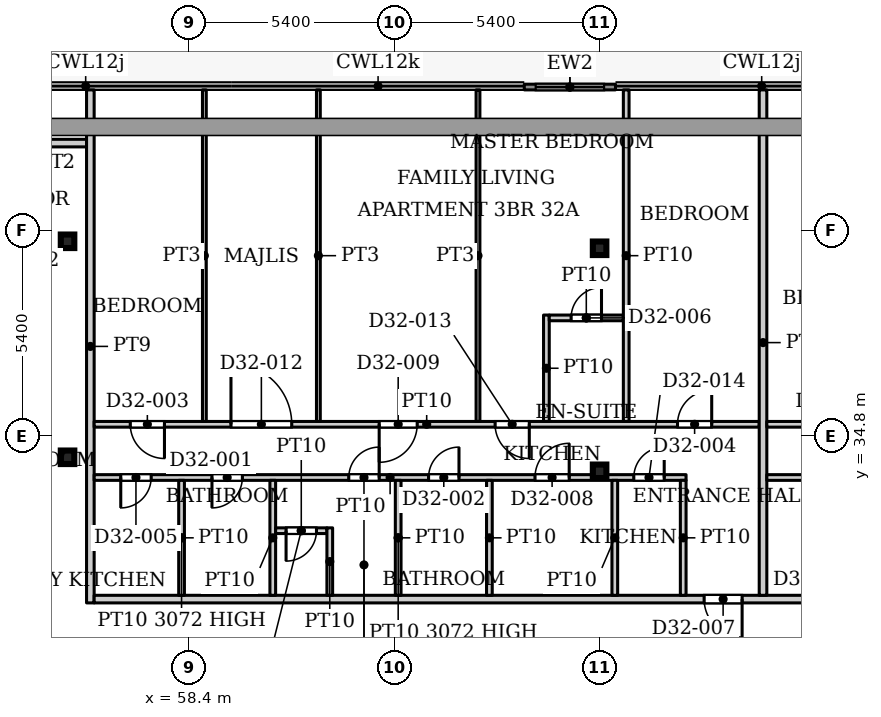
"""IFC4 building model, lengths in metres.
Left out: names, types, materials, properties, quantities, classifications, styles, units other than length and angle.
Written with IfcOpenShell. Run it as: python <this file> out.ifc"""

import sys

from ifc_helpers import new_model, si_unit, direction, frame, frame_2d, origin, origin_2d, place, context, subcontext, project, spatial, rectangle, hollow_rectangle, extrude, source, transform, mapped, element, fill, save


model = new_model("IFC4")
c1 = context("Model", 3, precision=1e-05, world=origin(), true_north=direction((0.0, 1.0)))
c2 = subcontext(c1, "Body", "Model", "MODEL_VIEW")
j1 = project(units=[si_unit("LENGTHUNIT", "METRE"), si_unit("PLANEANGLEUNIT", "RADIAN")], contexts=[c1])
p1 = place(None, origin())
s1 = spatial("IfcSite", under=j1, at=p1, CompositionType="ELEMENT")
p2 = place(p1, origin())
s2 = spatial("IfcBuilding", under=s1, at=p2, CompositionType="ELEMENT")
p3 = place(p2, frame((0.0, 0.0, 137.0)))
s3 = spatial("IfcBuildingStorey", under=s2, at=p3, CompositionType="ELEMENT", Elevation=137.0)
for number, where, z_axis, x_axis in (
    (1, (69.2, 33.863, 0.0), (0.0, 0.0, 1.0), (1.0, 0.0, 0.0)),
    (2, (55.2, 34.232, 0.0), (0.0, 0.0, 1.0), (1.0, 0.0, 0.0)),
    (3, (69.2, 39.732, 0.0), (0.0, 0.0, 1.0), (1.0, 0.0, 0.0)),
    (4, (55.2, 39.916, 0.0), (0.0, 0.0, 1.0), (1.0, 0.0, 0.0)),
):
    element("IfcColumn", number, at=place(p3, frame(where, z_axis=z_axis, x_axis=x_axis)), inside=s3, PredefinedType="COLUMN", context=c2, shape_type="SweptSolid", body=[
        extrude(hollow_rectangle(XDim=0.356, YDim=0.356, WallThickness=0.016, InnerFilletRadius=0.016, OuterFilletRadius=0.032, at=origin_2d()), origin(), (0.0, 0.0, 1.0), 3.9),
    ])
p4 = place(p3, frame((67.218, 43.975, 0.0), z_axis=(0.0, 0.0, 1.0), x_axis=(1.0, 0.0, 0.0)))
e5 = element("IfcWall", 5, at=p4, inside=s3, PredefinedType="SOLIDWALL", context=c2, shape_type="SweptSolid", body=[
    extrude(rectangle(XDim=2.4, YDim=0.15, at=frame_2d((1.2, 0.0))), origin(), (0.0, 0.0, 1.0), 3.75),
])
p5 = place(p4, frame((0.3, 0.0, 0.0)))
e6 = element("IfcOpeningElement", 6, at=p5, cuts=e5, PredefinedType="OPENING", context=c2, shape_type="SweptSolid", body=[
    extrude(rectangle(XDim=1.8, YDim=2.4, at=frame_2d((0.9, 1.2))), frame((0.0, 0.085, 0.0), z_axis=(0.0, -1.0, 0.0), x_axis=(1.0, 0.0, 0.0)), (0.0, 0.0, 1.0), 0.17),
])
p6 = place(p3, frame((53.5, 42.5, 0.0), z_axis=(0.0, 0.0, 1.0), x_axis=(1.0, 0.0, 0.0)))
e7 = element("IfcWall", 7, at=p6, inside=s3, PredefinedType="PARTITIONING", context=c2, shape_type="SweptSolid", body=[
    extrude(rectangle(XDim=2.2, YDim=0.2, at=frame_2d((1.1, 0.0))), origin(), (0.0, 0.0, 1.0), 3.6),
])
p7 = place(p3, frame((55.8, 30.4, 0.0), z_axis=(0.0, 0.0, 1.0), x_axis=(0.0, 1.0, 0.0)))
e8 = element("IfcWall", 8, at=p7, inside=s3, PredefinedType="PARTITIONING", context=c2, shape_type="SweptSolid", body=[
    extrude(rectangle(XDim=13.5, YDim=0.2, at=frame_2d((6.75, 0.0))), origin(), (0.0, 0.0, 1.0), 3.6),
])
p8 = place(p3, frame((55.9, 30.5, 0.0), z_axis=(0.0, 0.0, 1.0), x_axis=(1.0, 0.0, 0.0)))
e9 = element("IfcWall", 9, at=p8, inside=s3, PredefinedType="PARTITIONING", context=c2, shape_type="SweptSolid", body=[
    extrude(rectangle(XDim=42.2, YDim=0.2, at=frame_2d((21.1, 0.0))), origin(), (0.0, 0.0, 1.0), 3.6),
])
p9 = place(p8, frame((16.05, 0.0, 0.0)))
e10 = element("IfcOpeningElement", 10, at=p9, cuts=e9, PredefinedType="OPENING", context=c2, shape_type="SweptSolid", body=[
    extrude(rectangle(XDim=1.0, YDim=2.1, at=frame_2d((0.5, 1.05))), frame((0.0, 0.11, 0.0), z_axis=(0.0, -1.0, 0.0), x_axis=(1.0, 0.0, 0.0)), (0.0, 0.0, 1.0), 0.22),
])
p10 = place(p8, frame((22.8, 0.0, 0.0)))
e11 = element("IfcOpeningElement", 11, at=p10, cuts=e9, PredefinedType="OPENING", context=c2, shape_type="SweptSolid", body=[
    extrude(rectangle(XDim=1.0, YDim=2.1, at=frame_2d((0.5, 1.05))), frame((0.0, 0.11, 0.0), z_axis=(0.0, -1.0, 0.0), x_axis=(1.0, 0.0, 0.0)), (0.0, 0.0, 1.0), 0.22),
])
p11 = place(p8, frame((29.55, 0.0, 0.0)))
e12 = element("IfcOpeningElement", 12, at=p11, cuts=e9, PredefinedType="OPENING", context=c2, shape_type="SweptSolid", body=[
    extrude(rectangle(XDim=1.0, YDim=2.1, at=frame_2d((0.5, 1.05))), frame((0.0, 0.11, 0.0), z_axis=(0.0, -1.0, 0.0), x_axis=(1.0, 0.0, 0.0)), (0.0, 0.0, 1.0), 0.22),
])
p12 = place(p3, frame((55.9, 33.7, 0.0), z_axis=(0.0, 0.0, 1.0), x_axis=(1.0, 0.0, 0.0)))
e13 = element("IfcWall", 13, at=p12, inside=s3, PredefinedType="PARTITIONING", context=c2, shape_type="SweptSolid", body=[
    extrude(rectangle(XDim=15.575, YDim=0.15, at=frame_2d((7.788, 0.0))), origin(), (0.0, 0.0, 1.0), 3.6),
])
p13 = place(p12, frame((3.1, 0.0, 0.0)))
e14 = element("IfcOpeningElement", 14, at=p13, cuts=e13, PredefinedType="OPENING", context=c2, shape_type="SweptSolid", body=[
    extrude(rectangle(XDim=0.8, YDim=2.1, at=frame_2d((0.4, 1.05))), frame((0.0, 0.085, 0.0), z_axis=(0.0, -1.0, 0.0), x_axis=(1.0, 0.0, 0.0)), (0.0, 0.0, 1.0), 0.17),
])
p14 = place(p12, frame((8.8, 0.0, 0.0)))
e15 = element("IfcOpeningElement", 15, at=p14, cuts=e13, PredefinedType="OPENING", context=c2, shape_type="SweptSolid", body=[
    extrude(rectangle(XDim=0.8, YDim=2.1, at=frame_2d((0.4, 1.05))), frame((0.0, 0.085, 0.0), z_axis=(0.0, -1.0, 0.0), x_axis=(1.0, 0.0, 0.0)), (0.0, 0.0, 1.0), 0.17),
])
p15 = place(p12, frame((0.7, 0.0, 0.0)))
e16 = element("IfcOpeningElement", 16, at=p15, cuts=e13, PredefinedType="OPENING", context=c2, shape_type="SweptSolid", body=[
    extrude(rectangle(XDim=0.8, YDim=2.1, at=frame_2d((0.4, 1.05))), frame((0.0, 0.085, 0.0), z_axis=(0.0, -1.0, 0.0), x_axis=(1.0, 0.0, 0.0)), (0.0, 0.0, 1.0), 0.17),
])
p16 = place(p12, frame((11.6, 0.0, 0.0)))
e17 = element("IfcOpeningElement", 17, at=p16, cuts=e13, PredefinedType="OPENING", context=c2, shape_type="SweptSolid", body=[
    extrude(rectangle(XDim=0.9, YDim=2.1, at=frame_2d((0.45, 1.05))), frame((0.0, 0.085, 0.0), z_axis=(0.0, -1.0, 0.0), x_axis=(1.0, 0.0, 0.0)), (0.0, 0.0, 1.0), 0.17),
])
p17 = place(p12, frame((6.7, 0.0, 0.0)))
e18 = element("IfcOpeningElement", 18, at=p17, cuts=e13, PredefinedType="OPENING", context=c2, shape_type="SweptSolid", body=[
    extrude(rectangle(XDim=0.8, YDim=2.1, at=frame_2d((0.4, 1.05))), frame((0.0, 0.085, 0.0), z_axis=(0.0, -1.0, 0.0), x_axis=(1.0, 0.0, 0.0)), (0.0, 0.0, 1.0), 0.17),
])
p18 = place(p12, frame((14.2, 0.0, 0.0)))
e19 = element("IfcOpeningElement", 19, at=p18, cuts=e13, PredefinedType="OPENING", context=c2, shape_type="SweptSolid", body=[
    extrude(rectangle(XDim=0.8, YDim=2.1, at=frame_2d((0.4, 1.05))), frame((0.0, 0.085, 0.0), z_axis=(0.0, -1.0, 0.0), x_axis=(1.0, 0.0, 0.0)), (0.0, 0.0, 1.0), 0.17),
])
p19 = place(p3, frame((55.9, 35.1, 0.0), z_axis=(0.0, 0.0, 1.0), x_axis=(1.0, 0.0, 0.0)))
e20 = element("IfcWall", 20, at=p19, inside=s3, PredefinedType="PARTITIONING", context=c2, shape_type="SweptSolid", body=[
    extrude(rectangle(XDim=17.5, YDim=0.15, at=frame_2d((8.75, 0.0))), origin(), (0.0, 0.0, 1.0), 3.6),
])
p20 = place(p19, frame((0.95, 0.0, 0.0)))
e21 = element("IfcOpeningElement", 21, at=p20, cuts=e20, PredefinedType="OPENING", context=c2, shape_type="SweptSolid", body=[
    extrude(rectangle(XDim=0.9, YDim=2.1, at=frame_2d((0.45, 1.05))), frame((0.0, 0.085, 0.0), z_axis=(0.0, -1.0, 0.0), x_axis=(1.0, 0.0, 0.0)), (0.0, 0.0, 1.0), 0.17),
])
p21 = place(p19, frame((15.35, 0.0, 0.0)))
e22 = element("IfcOpeningElement", 22, at=p21, cuts=e20, PredefinedType="OPENING", context=c2, shape_type="SweptSolid", body=[
    extrude(rectangle(XDim=0.9, YDim=2.1, at=frame_2d((0.45, 1.05))), frame((0.0, 0.085, 0.0), z_axis=(0.0, -1.0, 0.0), x_axis=(1.0, 0.0, 0.0)), (0.0, 0.0, 1.0), 0.17),
])
p22 = place(p19, frame((7.5, 0.0, 0.0)))
e23 = element("IfcOpeningElement", 23, at=p22, cuts=e20, PredefinedType="OPENING", context=c2, shape_type="SweptSolid", body=[
    extrude(rectangle(XDim=1.0, YDim=2.1, at=frame_2d((0.5, 1.05))), frame((0.0, 0.085, 0.0), z_axis=(0.0, -1.0, 0.0), x_axis=(1.0, 0.0, 0.0)), (0.0, 0.0, 1.0), 0.17),
])
p23 = place(p19, frame((3.6, 0.0, 0.0)))
e24 = element("IfcOpeningElement", 24, at=p23, cuts=e20, PredefinedType="OPENING", context=c2, shape_type="SweptSolid", body=[
    extrude(rectangle(XDim=1.6, YDim=2.1, at=frame_2d((0.8, 1.05))), frame((0.0, 0.085, 0.0), z_axis=(0.0, -1.0, 0.0), x_axis=(1.0, 0.0, 0.0)), (0.0, 0.0, 1.0), 0.17),
])
p24 = place(p19, frame((10.55, 0.0, 0.0)))
e25 = element("IfcOpeningElement", 25, at=p24, cuts=e20, PredefinedType="OPENING", context=c2, shape_type="SweptSolid", body=[
    extrude(rectangle(XDim=0.9, YDim=2.1, at=frame_2d((0.45, 1.05))), frame((0.0, 0.085, 0.0), z_axis=(0.0, -1.0, 0.0), x_axis=(1.0, 0.0, 0.0)), (0.0, 0.0, 1.0), 0.17),
])
p25 = place(p3, frame((58.2, 30.6, 0.0), z_axis=(0.0, 0.0, 1.0), x_axis=(0.0, 1.0, 0.0)))
e26 = element("IfcWall", 26, at=p25, inside=s3, PredefinedType="PARTITIONING", context=c2, shape_type="SweptSolid", body=[
    extrude(rectangle(XDim=3.025, YDim=0.15, at=frame_2d((1.512, 0.0))), origin(), (0.0, 0.0, 1.0), 3.072),
])
p26 = place(p3, frame((58.8, 35.175, 0.0), z_axis=(0.0, 0.0, 1.0), x_axis=(0.0, 1.0, 0.0)))
e27 = element("IfcWall", 27, at=p26, inside=s3, PredefinedType="PARTITIONING", context=c2, shape_type="SweptSolid", body=[
    extrude(rectangle(XDim=8.725, YDim=0.1, at=frame_2d((4.362, 0.0))), origin(), (0.0, 0.0, 1.0), 3.6),
])
p27 = place(p3, frame((60.6, 30.6, 0.0), z_axis=(0.0, 0.0, 1.0), x_axis=(0.0, 1.0, 0.0)))
e28 = element("IfcWall", 28, at=p27, inside=s3, PredefinedType="PARTITIONING", context=c2, shape_type="SweptSolid", body=[
    extrude(rectangle(XDim=3.025, YDim=0.15, at=frame_2d((1.512, 0.0))), origin(), (0.0, 0.0, 1.0), 3.6),
])
p28 = place(p3, frame((60.675, 32.3, 0.0), z_axis=(0.0, 0.0, 1.0), x_axis=(1.0, 0.0, 0.0)))
e29 = element("IfcWall", 29, at=p28, inside=s3, PredefinedType="PARTITIONING", context=c2, shape_type="SweptSolid", body=[
    extrude(rectangle(XDim=1.35, YDim=0.15, at=frame_2d((0.675, 0.0))), origin(), (0.0, 0.0, 1.0), 3.6),
])
p29 = place(p28, frame((0.275, 0.0, 0.0)))
e30 = element("IfcOpeningElement", 30, at=p29, cuts=e29, PredefinedType="OPENING", context=c2, shape_type="SweptSolid", body=[
    extrude(rectangle(XDim=0.8, YDim=2.1, at=frame_2d((0.4, 1.05))), frame((0.0, 0.085, 0.0), z_axis=(0.0, -1.0, 0.0), x_axis=(1.0, 0.0, 0.0)), (0.0, 0.0, 1.0), 0.17),
])
p30 = place(p3, frame((61.8, 35.175, 0.0), z_axis=(0.0, 0.0, 1.0), x_axis=(0.0, 1.0, 0.0)))
e31 = element("IfcWall", 31, at=p30, inside=s3, PredefinedType="PARTITIONING", context=c2, shape_type="SweptSolid", body=[
    extrude(rectangle(XDim=8.725, YDim=0.1, at=frame_2d((4.362, 0.0))), origin(), (0.0, 0.0, 1.0), 3.6),
])
p31 = place(p3, frame((62.1, 30.6, 0.0), z_axis=(0.0, 0.0, 1.0), x_axis=(0.0, 1.0, 0.0)))
e32 = element("IfcWall", 32, at=p31, inside=s3, PredefinedType="PARTITIONING", context=c2, shape_type="SweptSolid", body=[
    extrude(rectangle(XDim=1.775, YDim=0.15, at=frame_2d((0.887, 0.0))), origin(), (0.0, 0.0, 1.0), 3.6),
])
p32 = place(p3, frame((63.9, 30.6, 0.0), z_axis=(0.0, 0.0, 1.0), x_axis=(0.0, 1.0, 0.0)))
e33 = element("IfcWall", 33, at=p32, inside=s3, PredefinedType="PARTITIONING", context=c2, shape_type="SweptSolid", body=[
    extrude(rectangle(XDim=3.025, YDim=0.15, at=frame_2d((1.512, 0.0))), origin(), (0.0, 0.0, 1.0), 3.072),
])
p33 = place(p3, frame((66.0, 35.175, 0.0), z_axis=(0.0, 0.0, 1.0), x_axis=(0.0, 1.0, 0.0)))
e34 = element("IfcWall", 34, at=p33, inside=s3, PredefinedType="PARTITIONING", context=c2, shape_type="SweptSolid", body=[
    extrude(rectangle(XDim=8.725, YDim=0.1, at=frame_2d((4.362, 0.0))), origin(), (0.0, 0.0, 1.0), 3.6),
])
p34 = place(p3, frame((66.3, 30.6, 0.0), z_axis=(0.0, 0.0, 1.0), x_axis=(0.0, 1.0, 0.0)))
e35 = element("IfcWall", 35, at=p34, inside=s3, PredefinedType="PARTITIONING", context=c2, shape_type="SweptSolid", body=[
    extrude(rectangle(XDim=3.025, YDim=0.15, at=frame_2d((1.512, 0.0))), origin(), (0.0, 0.0, 1.0), 3.6),
])
p35 = place(p3, frame((67.8, 35.175, 0.0), z_axis=(0.0, 0.0, 1.0), x_axis=(0.0, 1.0, 0.0)))
e36 = element("IfcWall", 36, at=p35, inside=s3, PredefinedType="PARTITIONING", context=c2, shape_type="SweptSolid", body=[
    extrude(rectangle(XDim=2.8, YDim=0.15, at=frame_2d((1.4, 0.0))), origin(), (0.0, 0.0, 1.0), 3.6),
])
p36 = place(p3, frame((67.875, 37.9, 0.0), z_axis=(0.0, 0.0, 1.0), x_axis=(1.0, 0.0, 0.0)))
e37 = element("IfcWall", 37, at=p36, inside=s3, PredefinedType="PARTITIONING", context=c2, shape_type="SweptSolid", body=[
    extrude(rectangle(XDim=1.95, YDim=0.15, at=frame_2d((0.975, 0.0))), origin(), (0.0, 0.0, 1.0), 3.6),
])
p37 = place(p36, frame((0.575, 0.0, 0.0)))
e38 = element("IfcOpeningElement", 38, at=p37, cuts=e37, PredefinedType="OPENING", context=c2, shape_type="SweptSolid", body=[
    extrude(rectangle(XDim=0.8, YDim=2.1, at=frame_2d((0.4, 1.05))), frame((0.0, 0.085, 0.0), z_axis=(0.0, -1.0, 0.0), x_axis=(1.0, 0.0, 0.0)), (0.0, 0.0, 1.0), 0.17),
])
p38 = place(p3, frame((69.6, 30.6, 0.0), z_axis=(0.0, 0.0, 1.0), x_axis=(0.0, 1.0, 0.0)))
e39 = element("IfcWall", 39, at=p38, inside=s3, PredefinedType="PARTITIONING", context=c2, shape_type="SweptSolid", body=[
    extrude(rectangle(XDim=3.025, YDim=0.15, at=frame_2d((1.512, 0.0))), origin(), (0.0, 0.0, 1.0), 3.6),
])
p39 = place(p3, frame((69.9, 35.175, 0.0), z_axis=(0.0, 0.0, 1.0), x_axis=(0.0, 1.0, 0.0)))
e40 = element("IfcWall", 40, at=p39, inside=s3, PredefinedType="PARTITIONING", context=c2, shape_type="SweptSolid", body=[
    extrude(rectangle(XDim=8.725, YDim=0.15, at=frame_2d((4.362, 0.0))), origin(), (0.0, 0.0, 1.0), 3.6),
])
p40 = place(p3, frame((71.4, 30.6, 0.0), z_axis=(0.0, 0.0, 1.0), x_axis=(0.0, 1.0, 0.0)))
e41 = element("IfcWall", 41, at=p40, inside=s3, PredefinedType="PARTITIONING", context=c2, shape_type="SweptSolid", body=[
    extrude(rectangle(XDim=3.025, YDim=0.15, at=frame_2d((1.512, 0.0))), origin(), (0.0, 0.0, 1.0), 3.6),
])
p41 = place(p3, frame((73.5, 30.6, 0.0), z_axis=(0.0, 0.0, 1.0), x_axis=(0.0, 1.0, 0.0)))
e42 = element("IfcWall", 42, at=p41, inside=s3, PredefinedType="PARTITIONING", context=c2, shape_type="SweptSolid", body=[
    extrude(rectangle(XDim=13.3, YDim=0.2, at=frame_2d((6.65, 0.0))), origin(), (0.0, 0.0, 1.0), 3.6),
])
p42 = place(p3, frame((73.6, 33.7, 0.0), z_axis=(0.0, 0.0, 1.0), x_axis=(1.0, 0.0, 0.0)))
e43 = element("IfcWall", 43, at=p42, inside=s3, PredefinedType="PARTITIONING", context=c2, shape_type="SweptSolid", body=[
    extrude(rectangle(XDim=4.775, YDim=0.15, at=frame_2d((2.387, 0.0))), origin(), (0.0, 0.0, 1.0), 3.6),
])
p43 = place(p42, frame((1.1, 0.0, 0.0)))
e44 = element("IfcOpeningElement", 44, at=p43, cuts=e43, PredefinedType="OPENING", context=c2, shape_type="SweptSolid", body=[
    extrude(rectangle(XDim=0.9, YDim=2.1, at=frame_2d((0.45, 1.05))), frame((0.0, 0.085, 0.0), z_axis=(0.0, -1.0, 0.0), x_axis=(1.0, 0.0, 0.0)), (0.0, 0.0, 1.0), 0.17),
])
p44 = place(p42, frame((3.55, 0.0, 0.0)))
e45 = element("IfcOpeningElement", 45, at=p44, cuts=e43, PredefinedType="OPENING", context=c2, shape_type="SweptSolid", body=[
    extrude(rectangle(XDim=0.8, YDim=2.1, at=frame_2d((0.4, 1.05))), frame((0.0, 0.085, 0.0), z_axis=(0.0, -1.0, 0.0), x_axis=(1.0, 0.0, 0.0)), (0.0, 0.0, 1.0), 0.17),
])
p45 = place(p3, frame((73.6, 35.1, 0.0), z_axis=(0.0, 0.0, 1.0), x_axis=(1.0, 0.0, 0.0)))
e46 = element("IfcWall", 46, at=p45, inside=s3, PredefinedType="PARTITIONING", context=c2, shape_type="SweptSolid", body=[
    extrude(rectangle(XDim=8.8, YDim=0.15, at=frame_2d((4.4, 0.0))), origin(), (0.0, 0.0, 1.0), 3.6),
])
p46 = place(p45, frame((1.4, 0.0, 0.0)))
e47 = element("IfcOpeningElement", 47, at=p46, cuts=e46, PredefinedType="OPENING", context=c2, shape_type="SweptSolid", body=[
    extrude(rectangle(XDim=0.9, YDim=2.1, at=frame_2d((0.45, 1.05))), frame((0.0, 0.085, 0.0), z_axis=(0.0, -1.0, 0.0), x_axis=(1.0, 0.0, 0.0)), (0.0, 0.0, 1.0), 0.17),
])
p47 = place(p45, frame((5.85, 0.0, 0.0)))
e48 = element("IfcOpeningElement", 48, at=p47, cuts=e46, PredefinedType="OPENING", context=c2, shape_type="SweptSolid", body=[
    extrude(rectangle(XDim=1.0, YDim=2.1, at=frame_2d((0.5, 1.05))), frame((0.0, 0.085, 0.0), z_axis=(0.0, -1.0, 0.0), x_axis=(1.0, 0.0, 0.0)), (0.0, 0.0, 1.0), 0.17),
])
m1 = source(origin(), c2, "Body", "SweptSolid", [
    extrude(rectangle(XDim=1.8, YDim=2.4, at=frame_2d((0.9, 1.2))), frame((0.0, 0.025, 0.0), z_axis=(0.0, -1.0, 0.0), x_axis=(1.0, 0.0, 0.0)), (0.0, 0.0, 1.0), 0.05),
])
p48 = place(p5, origin())
e49 = element("IfcDoor", 49, at=p48, inside=s3, OperationType="SLIDING_TO_LEFT", PredefinedType="DOOR", context=c2, shape_type="MappedRepresentation", body=[
    mapped(m1, transform((0.0, 0.0, 0.0), x_axis=(1.0, 0.0, 0.0), y_axis=(0.0, 1.0, 0.0), z_axis=(0.0, 0.0, 1.0), scale=1.0)),
])
fill(e6, e49)
m2 = source(origin(), c2, "Body", "SweptSolid", [
    extrude(rectangle(XDim=0.8, YDim=2.1, at=frame_2d((0.4, 1.05))), frame((0.0, 0.025, 0.0), z_axis=(0.0, -1.0, 0.0), x_axis=(1.0, 0.0, 0.0)), (0.0, 0.0, 1.0), 0.05),
])
p49 = place(p13, origin())
e50 = element("IfcDoor", 50, at=p49, inside=s3, OperationType="SINGLE_SWING_RIGHT", PredefinedType="DOOR", context=c2, shape_type="MappedRepresentation", body=[
    mapped(m2, transform((0.0, 0.0, 0.0), x_axis=(1.0, 0.0, 0.0), y_axis=(0.0, 1.0, 0.0), z_axis=(0.0, 0.0, 1.0), scale=1.0)),
])
fill(e14, e50)
p50 = place(p14, origin())
e51 = element("IfcDoor", 51, at=p50, inside=s3, OperationType="SINGLE_SWING_LEFT", PredefinedType="DOOR", context=c2, shape_type="MappedRepresentation", body=[
    mapped(m2, transform((0.0, 0.0, 0.0), x_axis=(1.0, 0.0, 0.0), y_axis=(0.0, 1.0, 0.0), z_axis=(0.0, 0.0, 1.0), scale=1.0)),
])
fill(e15, e51)
m3 = source(origin(), c2, "Body", "SweptSolid", [
    extrude(rectangle(XDim=0.9, YDim=2.1, at=frame_2d((0.45, 1.05))), frame((0.0, 0.025, 0.0), z_axis=(0.0, -1.0, 0.0), x_axis=(1.0, 0.0, 0.0)), (0.0, 0.0, 1.0), 0.05),
])
p51 = place(p20, origin())
e52 = element("IfcDoor", 52, at=p51, inside=s3, OperationType="SINGLE_SWING_RIGHT", PredefinedType="DOOR", context=c2, shape_type="MappedRepresentation", body=[
    mapped(m3, transform((0.0, 0.0, 0.0), x_axis=(1.0, 0.0, 0.0), y_axis=(0.0, 1.0, 0.0), z_axis=(0.0, 0.0, 1.0), scale=1.0)),
])
fill(e21, e52)
p52 = place(p21, origin())
e53 = element("IfcDoor", 53, at=p52, inside=s3, OperationType="SINGLE_SWING_LEFT", PredefinedType="DOOR", context=c2, shape_type="MappedRepresentation", body=[
    mapped(m3, transform((0.0, 0.0, 0.0), x_axis=(1.0, 0.0, 0.0), y_axis=(0.0, 1.0, 0.0), z_axis=(0.0, 0.0, 1.0), scale=1.0)),
])
fill(e22, e53)
p53 = place(p15, origin())
e54 = element("IfcDoor", 54, at=p53, inside=s3, OperationType="SINGLE_SWING_RIGHT", PredefinedType="DOOR", context=c2, shape_type="MappedRepresentation", body=[
    mapped(m2, transform((0.0, 0.0, 0.0), x_axis=(1.0, 0.0, 0.0), y_axis=(0.0, 1.0, 0.0), z_axis=(0.0, 0.0, 1.0), scale=1.0)),
])
fill(e16, e54)
p54 = place(p37, origin())
e55 = element("IfcDoor", 55, at=p54, inside=s3, OperationType="SINGLE_SWING_LEFT", PredefinedType="DOOR", context=c2, shape_type="MappedRepresentation", body=[
    mapped(m2, transform((0.0, 0.0, 0.0), x_axis=(1.0, 0.0, 0.0), y_axis=(0.0, 1.0, 0.0), z_axis=(0.0, 0.0, 1.0), scale=1.0)),
])
fill(e38, e55)
m4 = source(origin(), c2, "Body", "SweptSolid", [
    extrude(rectangle(XDim=1.0, YDim=2.1, at=frame_2d((0.5, 1.05))), frame((0.0, 0.025, 0.0), z_axis=(0.0, -1.0, 0.0), x_axis=(1.0, 0.0, 0.0)), (0.0, 0.0, 1.0), 0.05),
])
p55 = place(p9, origin())
e56 = element("IfcDoor", 56, at=p55, inside=s3, OperationType="SINGLE_SWING_RIGHT", PredefinedType="DOOR", context=c2, shape_type="MappedRepresentation", body=[
    mapped(m4, transform((0.0, 0.0, 0.0), x_axis=(1.0, 0.0, 0.0), y_axis=(0.0, 1.0, 0.0), z_axis=(0.0, 0.0, 1.0), scale=1.0)),
])
fill(e10, e56)
p56 = place(p16, origin())
e57 = element("IfcDoor", 57, at=p56, inside=s3, OperationType="SINGLE_SWING_LEFT", PredefinedType="DOOR", context=c2, shape_type="MappedRepresentation", body=[
    mapped(m3, transform((0.0, 0.0, 0.0), x_axis=(1.0, 0.0, 0.0), y_axis=(0.0, 1.0, 0.0), z_axis=(0.0, 0.0, 1.0), scale=1.0)),
])
fill(e17, e57)
m5 = source(origin(), c2, "Body", "SweptSolid", [
    extrude(rectangle(XDim=1.0, YDim=2.1, at=frame_2d((0.5, 1.05))), frame((0.0, 0.025, 0.0), z_axis=(0.0, -1.0, 0.0), x_axis=(1.0, 0.0, 0.0)), (0.0, 0.0, 1.0), 0.05),
])
p57 = place(p22, origin())
e58 = element("IfcDoor", 58, at=p57, inside=s3, OperationType="SINGLE_SWING_RIGHT", PredefinedType="DOOR", context=c2, shape_type="MappedRepresentation", body=[
    mapped(m5, transform((0.0, 0.0, 0.0), x_axis=(1.0, 0.0, 0.0), y_axis=(0.0, 1.0, 0.0), z_axis=(0.0, 0.0, 1.0), scale=1.0)),
])
fill(e23, e58)
p58 = place(p17, origin())
e59 = element("IfcDoor", 59, at=p58, inside=s3, OperationType="SINGLE_SWING_LEFT", PredefinedType="DOOR", context=c2, shape_type="MappedRepresentation", body=[
    mapped(m2, transform((0.0, 0.0, 0.0), x_axis=(1.0, 0.0, 0.0), y_axis=(0.0, 1.0, 0.0), z_axis=(0.0, 0.0, 1.0), scale=1.0)),
])
fill(e18, e59)
p59 = place(p29, origin())
e60 = element("IfcDoor", 60, at=p59, inside=s3, OperationType="SINGLE_SWING_RIGHT", PredefinedType="DOOR", context=c2, shape_type="MappedRepresentation", body=[
    mapped(m2, transform((0.0, 0.0, 0.0), x_axis=(1.0, 0.0, 0.0), y_axis=(0.0, 1.0, 0.0), z_axis=(0.0, 0.0, 1.0), scale=1.0)),
])
fill(e30, e60)
m6 = source(origin(), c2, "Body", "SweptSolid", [
    extrude(rectangle(XDim=1.6, YDim=2.1, at=frame_2d((0.8, 1.05))), frame((0.0, 0.025, 0.0), z_axis=(0.0, -1.0, 0.0), x_axis=(1.0, 0.0, 0.0)), (0.0, 0.0, 1.0), 0.05),
])
p60 = place(p23, origin())
e61 = element("IfcDoor", 61, at=p60, inside=s3, OperationType="DOUBLE_DOOR_SINGLE_SWING", PredefinedType="DOOR", context=c2, shape_type="MappedRepresentation", body=[
    mapped(m6, transform((0.0, 0.0, 0.0), x_axis=(1.0, 0.0, 0.0), y_axis=(0.0, 1.0, 0.0), z_axis=(0.0, 0.0, 1.0), scale=1.0)),
])
fill(e24, e61)
p61 = place(p24, origin())
e62 = element("IfcDoor", 62, at=p61, inside=s3, OperationType="SINGLE_SWING_RIGHT", PredefinedType="DOOR", context=c2, shape_type="MappedRepresentation", body=[
    mapped(m3, transform((0.0, 0.0, 0.0), x_axis=(1.0, 0.0, 0.0), y_axis=(0.0, 1.0, 0.0), z_axis=(0.0, 0.0, 1.0), scale=1.0)),
])
fill(e25, e62)
p62 = place(p18, origin())
e63 = element("IfcDoor", 63, at=p62, inside=s3, OperationType="SINGLE_SWING_LEFT", PredefinedType="DOOR", context=c2, shape_type="MappedRepresentation", body=[
    mapped(m2, transform((0.0, 0.0, 0.0), x_axis=(1.0, 0.0, 0.0), y_axis=(0.0, 1.0, 0.0), z_axis=(0.0, 0.0, 1.0), scale=1.0)),
])
fill(e19, e63)
save(model, sys.argv[1])
